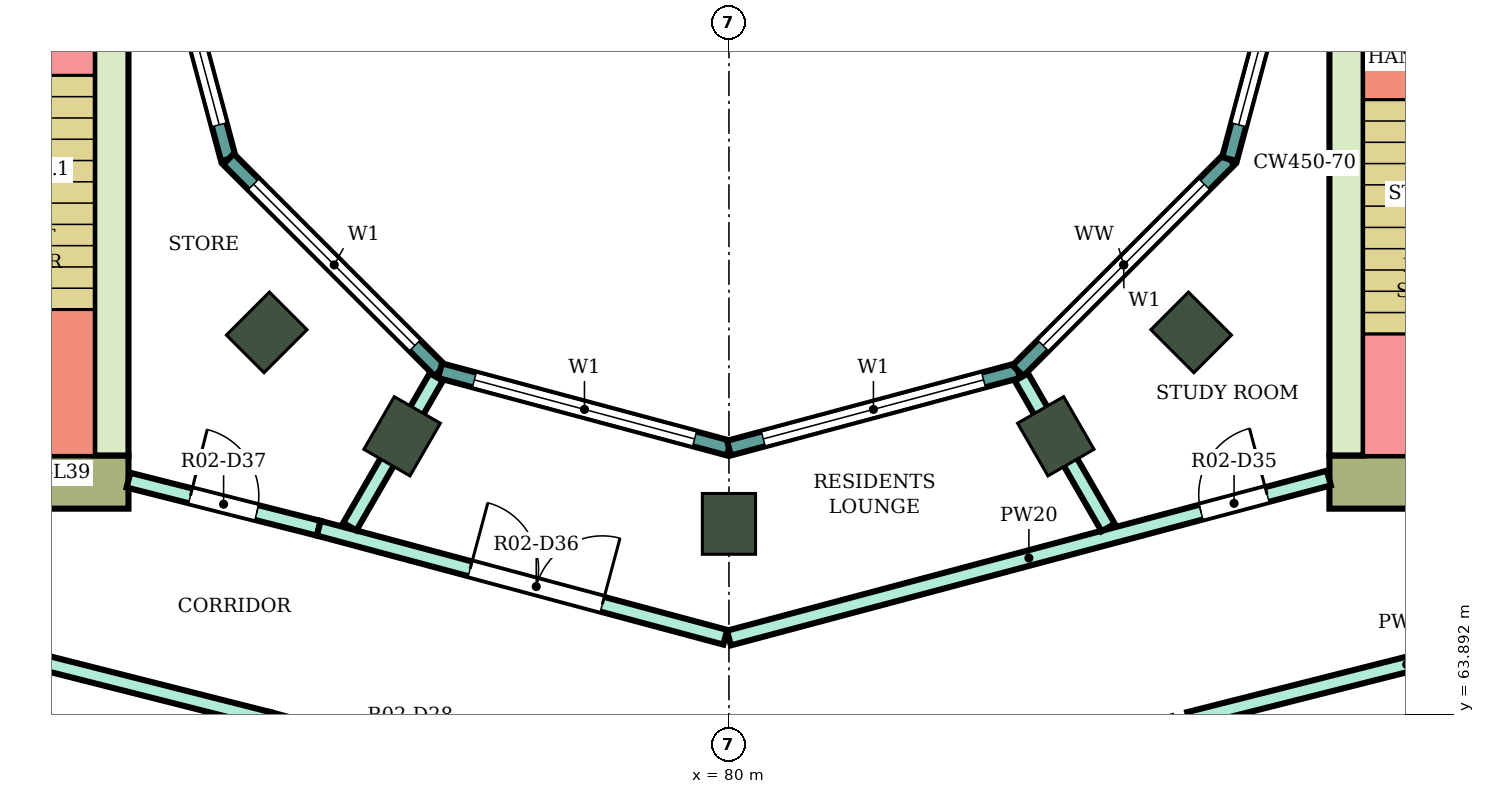
"""IFC4 building model, lengths in metres.
Left out: names, types, materials, properties, quantities, classifications, styles, units other than length and angle.
Written with IfcOpenShell. Run it as: python <this file> out.ifc"""

import sys

from ifc_helpers import new_model, si_unit, direction, frame, frame_2d, origin, origin_2d, place, context, subcontext, project, spatial, rectangle, extrude, element, fill, save


model = new_model("IFC4")
c1 = context("Model", 3, precision=1e-05, world=origin(), true_north=direction((0.0, 1.0)))
c2 = subcontext(c1, "Body", "Model", "MODEL_VIEW")
j1 = project(units=[si_unit("LENGTHUNIT", "METRE"), si_unit("PLANEANGLEUNIT", "RADIAN")], contexts=[c1])
p1 = place(None, origin())
s1 = spatial("IfcSite", under=j1, at=p1, CompositionType="ELEMENT")
p2 = place(p1, origin())
s2 = spatial("IfcBuilding", under=s1, at=p2, CompositionType="ELEMENT")
p3 = place(p2, frame((0.0, 0.0, 170.0)))
s3 = spatial("IfcBuildingStorey", under=s2, at=p3, CompositionType="ELEMENT", Elevation=170.0)
for number, where, z_axis, x_axis in (
    (1, (73.919, 68.919, 0.0), (0.0, 0.0, 1.0), (-0.707, -0.707, 0.0)),
    (2, (75.7, 67.552, 0.0), (0.0, 0.0, 1.0), (-0.5, -0.866, 0.0)),
    (3, (80.0, 66.4, 0.0), (0.0, 0.0, 1.0), (0.0, -1.0, 0.0)),
    (4, (84.3, 67.552, 0.0), (0.0, 0.0, 1.0), (0.5, -0.866, 0.0)),
    (5, (86.081, 68.919, 0.0), (0.0, 0.0, 1.0), (0.707, -0.707, 0.0)),
):
    element("IfcColumn", number, at=place(p3, frame(where, z_axis=z_axis, x_axis=x_axis)), inside=s3, PredefinedType="COLUMN", context=c2, shape_type="SweptSolid", body=[
        extrude(rectangle(XDim=0.8, YDim=0.7, at=origin_2d()), origin(), (0.0, 0.0, 1.0), 4.1),
    ])
p4 = place(p3, frame((87.9, 66.95, 0.0), z_axis=(0.0, 0.0, 1.0), x_axis=(1.0, 0.0, 0.0)))
e6 = element("IfcWall", 6, at=p4, inside=s3, PredefinedType="SHEAR", context=c2, shape_type="SweptSolid", body=[
    extrude(rectangle(XDim=14.8, YDim=0.7, at=frame_2d((7.4, 0.0))), origin(), (0.0, 0.0, 1.0), 3.78),
])
p5 = place(p4, frame((4.2, 0.0, 0.0)))
e7 = element("IfcOpeningElement", 7, at=p5, cuts=e6, PredefinedType="OPENING", context=c2, shape_type="SweptSolid", body=[
    extrude(rectangle(XDim=2.4, YDim=2.4, at=frame_2d((1.2, 1.2))), frame((0.0, 0.36, 0.0), z_axis=(0.0, -1.0, 0.0), x_axis=(1.0, 0.0, 0.0)), (0.0, 0.0, 1.0), 0.72),
])
p6 = place(p3, frame((88.125, 67.3, 0.0), z_axis=(0.0, 0.0, 1.0), x_axis=(0.0, 1.0, 0.0)))
e8 = element("IfcWall", 8, at=p6, inside=s3, PredefinedType="SHEAR", context=c2, shape_type="SweptSolid", body=[
    extrude(rectangle(XDim=7.7, YDim=0.45, at=frame_2d((3.85, 0.0))), origin(), (0.0, 0.0, 1.0), 3.78),
])
p7 = place(p3, frame((72.1, 66.95, 0.0), z_axis=(0.0, 0.0, 1.0), x_axis=(-1.0, 0.0, 0.0)))
e9 = element("IfcWall", 9, at=p7, inside=s3, PredefinedType="SHEAR", context=c2, shape_type="SweptSolid", body=[
    extrude(rectangle(XDim=14.8, YDim=0.7, at=frame_2d((7.4, 0.0))), origin(), (0.0, 0.0, 1.0), 3.78),
])
p8 = place(p7, frame((4.2, 0.0, 0.0)))
e10 = element("IfcOpeningElement", 10, at=p8, cuts=e9, PredefinedType="OPENING", context=c2, shape_type="SweptSolid", body=[
    extrude(rectangle(XDim=2.4, YDim=2.4, at=frame_2d((1.2, 1.2))), frame((0.0, 0.36, 0.0), z_axis=(0.0, -1.0, 0.0), x_axis=(1.0, 0.0, 0.0)), (0.0, 0.0, 1.0), 0.72),
])
p9 = place(p3, frame((71.875, 75.0, 0.0), z_axis=(0.0, 0.0, 1.0), x_axis=(0.0, -1.0, 0.0)))
e11 = element("IfcWall", 11, at=p9, inside=s3, PredefinedType="SHEAR", context=c2, shape_type="SweptSolid", body=[
    extrude(rectangle(XDim=7.7, YDim=0.45, at=frame_2d((3.85, 0.0))), origin(), (0.0, 0.0, 1.0), 3.78),
])
p10 = place(p3, frame((72.396, 75.0, 0.0), z_axis=(0.0, 0.0, 1.0), x_axis=(0.258789828301, -0.965933654434, 0.0)))
e12 = element("IfcWall", 12, at=p10, inside=s3, PredefinedType="NOTDEFINED", context=c2, shape_type="SweptSolid", body=[
    extrude(rectangle(XDim=3.936, YDim=0.2, at=frame_2d((1.968, 0.0))), origin(), (0.0, 0.0, 1.0), 4.1),
])
p11 = place(p10, frame((0.468, 0.0, 0.9)))
e13 = element("IfcOpeningElement", 13, at=p11, cuts=e12, PredefinedType="OPENING", context=c2, shape_type="SweptSolid", body=[
    extrude(rectangle(XDim=3.0, YDim=2.3, at=frame_2d((1.5, 1.15))), frame((0.0, 0.11, 0.0), z_axis=(0.0, -1.0, 0.0), x_axis=(1.0, 0.0, 0.0)), (0.0, 0.0, 1.0), 0.22),
])
p12 = place(p3, frame((73.415, 71.198, 0.0), z_axis=(0.0, 0.0, 1.0), x_axis=(0.707106781187, -0.707106781187, 0.0)))
e14 = element("IfcWall", 14, at=p12, inside=s3, PredefinedType="NOTDEFINED", context=c2, shape_type="SweptSolid", body=[
    extrude(rectangle(XDim=3.936, YDim=0.2, at=frame_2d((1.968, 0.0))), origin(), (0.0, 0.0, 1.0), 4.1),
])
p13 = place(p12, frame((0.468, 0.0, 0.9)))
e15 = element("IfcOpeningElement", 15, at=p13, cuts=e14, PredefinedType="OPENING", context=c2, shape_type="SweptSolid", body=[
    extrude(rectangle(XDim=3.0, YDim=2.3, at=frame_2d((1.5, 1.15))), frame((0.0, 0.11, 0.0), z_axis=(0.0, -1.0, 0.0), x_axis=(1.0, 0.0, 0.0)), (0.0, 0.0, 1.0), 0.22),
])
p14 = place(p3, frame((76.198, 68.415, 0.0), z_axis=(0.0, 0.0, 1.0), x_axis=(0.965933654434, -0.258789828301, 0.0)))
e16 = element("IfcWall", 16, at=p14, inside=s3, PredefinedType="NOTDEFINED", context=c2, shape_type="SweptSolid", body=[
    extrude(rectangle(XDim=3.936, YDim=0.2, at=frame_2d((1.968, 0.0))), origin(), (0.0, 0.0, 1.0), 4.1),
])
p15 = place(p14, frame((0.468, 0.0, 0.9)))
e17 = element("IfcOpeningElement", 17, at=p15, cuts=e16, PredefinedType="OPENING", context=c2, shape_type="SweptSolid", body=[
    extrude(rectangle(XDim=3.0, YDim=2.3, at=frame_2d((1.5, 1.15))), frame((0.0, 0.11, 0.0), z_axis=(0.0, -1.0, 0.0), x_axis=(1.0, 0.0, 0.0)), (0.0, 0.0, 1.0), 0.22),
])
p16 = place(p3, frame((80.0, 67.396, 0.0), z_axis=(0.0, 0.0, 1.0), x_axis=(0.965933654434, 0.258789828301, 0.0)))
e18 = element("IfcWall", 18, at=p16, inside=s3, PredefinedType="NOTDEFINED", context=c2, shape_type="SweptSolid", body=[
    extrude(rectangle(XDim=3.936, YDim=0.2, at=frame_2d((1.968, 0.0))), origin(), (0.0, 0.0, 1.0), 4.1),
])
p17 = place(p16, frame((0.468, 0.0, 0.9)))
e19 = element("IfcOpeningElement", 19, at=p17, cuts=e18, PredefinedType="OPENING", context=c2, shape_type="SweptSolid", body=[
    extrude(rectangle(XDim=3.0, YDim=2.3, at=frame_2d((1.5, 1.15))), frame((0.0, 0.11, 0.0), z_axis=(0.0, -1.0, 0.0), x_axis=(1.0, 0.0, 0.0)), (0.0, 0.0, 1.0), 0.22),
])
p18 = place(p3, frame((83.802, 68.415, 0.0), z_axis=(0.0, 0.0, 1.0), x_axis=(0.707106781187, 0.707106781187, 0.0)))
e20 = element("IfcWall", 20, at=p18, inside=s3, PredefinedType="NOTDEFINED", context=c2, shape_type="SweptSolid", body=[
    extrude(rectangle(XDim=3.936, YDim=0.2, at=frame_2d((1.968, 0.0))), origin(), (0.0, 0.0, 1.0), 4.1),
])
p19 = place(p18, frame((0.468, 0.0, 0.9)))
e21 = element("IfcOpeningElement", 21, at=p19, cuts=e20, PredefinedType="OPENING", context=c2, shape_type="SweptSolid", body=[
    extrude(rectangle(XDim=3.0, YDim=2.3, at=frame_2d((1.5, 1.15))), frame((0.0, 0.11, 0.0), z_axis=(0.0, -1.0, 0.0), x_axis=(1.0, 0.0, 0.0)), (0.0, 0.0, 1.0), 0.22),
])
p20 = place(p3, frame((86.585, 71.198, 0.0), z_axis=(0.0, 0.0, 1.0), x_axis=(0.258789828301, 0.965933654434, 0.0)))
e22 = element("IfcWall", 22, at=p20, inside=s3, PredefinedType="NOTDEFINED", context=c2, shape_type="SweptSolid", body=[
    extrude(rectangle(XDim=3.936, YDim=0.2, at=frame_2d((1.968, 0.0))), origin(), (0.0, 0.0, 1.0), 4.1),
])
p21 = place(p20, frame((0.468, 0.0, 0.9)))
e23 = element("IfcOpeningElement", 23, at=p21, cuts=e22, PredefinedType="OPENING", context=c2, shape_type="SweptSolid", body=[
    extrude(rectangle(XDim=3.0, YDim=2.3, at=frame_2d((1.5, 1.15))), frame((0.0, 0.11, 0.0), z_axis=(0.0, -1.0, 0.0), x_axis=(1.0, 0.0, 0.0)), (0.0, 0.0, 1.0), 0.22),
])
p22 = place(p3, frame((69.86, 64.86, 0.0), z_axis=(0.0, 0.0, 1.0), x_axis=(0.96942980222, -0.245368821506, 0.0)))
e24 = element("IfcWall", 24, at=p22, inside=s3, PredefinedType="PARTITIONING", context=c2, shape_type="SweptSolid", body=[
    extrude(rectangle(XDim=4.216, YDim=0.2, at=frame_2d((2.108, 0.0))), origin(), (0.0, 0.0, 1.0), 3.65),
])
p23 = place(p3, frame((72.1, 66.975, 0.0), z_axis=(0.0, 0.0, 1.0), x_axis=(0.969471314457, -0.245204752086, 0.0)))
e25 = element("IfcWall", 25, at=p23, inside=s3, PredefinedType="PARTITIONING", context=c2, shape_type="SweptSolid", body=[
    extrude(rectangle(XDim=2.582, YDim=0.2, at=frame_2d((1.291, 0.0))), origin(), (0.0, 0.0, 1.0), 3.65),
])
p24 = place(p23, frame((0.841, 0.0, 0.0)))
e26 = element("IfcOpeningElement", 26, at=p24, cuts=e25, PredefinedType="OPENING", context=c2, shape_type="SweptSolid", body=[
    extrude(rectangle(XDim=0.9, YDim=2.1, at=frame_2d((0.45, 1.05))), frame((0.0, 0.11, 0.0), z_axis=(0.0, -1.0, 0.0), x_axis=(1.0, 0.0, 0.0)), (0.0, 0.0, 1.0), 0.22),
])
p25 = place(p3, frame((73.947, 63.826, 0.0), z_axis=(0.0, 0.0, 1.0), x_axis=(0.965908253407, -0.258884619088, 0.0)))
e27 = element("IfcWall", 27, at=p25, inside=s3, PredefinedType="PARTITIONING", context=c2, shape_type="SweptSolid", body=[
    extrude(rectangle(XDim=6.217, YDim=0.2, at=frame_2d((3.108, 0.0))), origin(), (0.0, 0.0, 1.0), 3.65),
])
p26 = place(p25, frame((1.424, 0.0, 0.0)))
e28 = element("IfcOpeningElement", 28, at=p26, cuts=e27, PredefinedType="OPENING", context=c2, shape_type="SweptSolid", body=[
    extrude(rectangle(XDim=1.0, YDim=2.1, at=frame_2d((0.5, 1.05))), frame((0.0, 0.11, 0.0), z_axis=(0.0, -1.0, 0.0), x_axis=(1.0, 0.0, 0.0)), (0.0, 0.0, 1.0), 0.22),
])
p27 = place(p3, frame((74.603, 66.342, 0.0), z_axis=(0.0, 0.0, 1.0), x_axis=(0.965895298152, -0.258932950796, 0.0)))
e29 = element("IfcWall", 29, at=p27, inside=s3, PredefinedType="PARTITIONING", context=c2, shape_type="SweptSolid", body=[
    extrude(rectangle(XDim=5.538, YDim=0.2, at=frame_2d((2.769, 0.0))), origin(), (0.0, 0.0, 1.0), 3.65),
])
p28 = place(p27, frame((2.062, 0.0, 0.0)))
e30 = element("IfcOpeningElement", 30, at=p28, cuts=e29, PredefinedType="OPENING", context=c2, shape_type="SweptSolid", body=[
    extrude(rectangle(XDim=1.8, YDim=2.1, at=frame_2d((0.9, 1.05))), frame((0.0, 0.11, 0.0), z_axis=(0.0, -1.0, 0.0), x_axis=(1.0, 0.0, 0.0)), (0.0, 0.0, 1.0), 0.22),
])
p29 = place(p3, frame((75.012, 66.363, 0.0), z_axis=(0.0, 0.0, 1.0), x_axis=(0.500168489725, 0.86592810434, 0.0)))
e31 = element("IfcWall", 31, at=p29, inside=s3, PredefinedType="PARTITIONING", context=c2, shape_type="SweptSolid", body=[
    extrude(rectangle(XDim=2.274, YDim=0.2, at=frame_2d((1.137, 0.0))), origin(), (0.0, 0.0, 1.0), 3.65),
])
p30 = place(p3, frame((80.0, 64.898, 0.0), z_axis=(0.0, 0.0, 1.0), x_axis=(0.966237419782, 0.257653349704, 0.0)))
e32 = element("IfcWall", 32, at=p30, inside=s3, PredefinedType="PARTITIONING", context=c2, shape_type="SweptSolid", body=[
    extrude(rectangle(XDim=8.169, YDim=0.2, at=frame_2d((4.084, 0.0))), origin(), (0.0, 0.0, 1.0), 3.65),
])
p31 = place(p30, frame((6.428, 0.0, 0.0)))
e33 = element("IfcOpeningElement", 33, at=p31, cuts=e32, PredefinedType="OPENING", context=c2, shape_type="SweptSolid", body=[
    extrude(rectangle(XDim=0.9, YDim=2.1, at=frame_2d((0.45, 1.05))), frame((0.0, 0.11, 0.0), z_axis=(0.0, -1.0, 0.0), x_axis=(1.0, 0.0, 0.0)), (0.0, 0.0, 1.0), 0.22),
])
p32 = place(p3, frame((83.847, 68.331, 0.0), z_axis=(0.0, 0.0, 1.0), x_axis=(0.499851978358, -0.866110847255, 0.0)))
e34 = element("IfcWall", 34, at=p32, inside=s3, PredefinedType="PARTITIONING", context=c2, shape_type="SweptSolid", body=[
    extrude(rectangle(XDim=2.284, YDim=0.2, at=frame_2d((1.142, 0.0))), origin(), (0.0, 0.0, 1.0), 3.65),
])
p33 = place(p3, frame((86.053, 63.826, 0.0), z_axis=(0.0, 0.0, 1.0), x_axis=(0.969490004987, 0.245130843083, 0.0)))
e35 = element("IfcWall", 35, at=p33, inside=s3, PredefinedType="PARTITIONING", context=c2, shape_type="SweptSolid", body=[
    extrude(rectangle(XDim=5.908, YDim=0.2, at=frame_2d((2.954, 0.0))), origin(), (0.0, 0.0, 1.0), 3.65),
])
p34 = place(p11, origin())
e36 = element("IfcWindow", 36, at=p34, inside=s3, PartitioningType="SINGLE_PANEL", PredefinedType="WINDOW", context=c2, shape_type="SweptSolid", body=[
    extrude(rectangle(XDim=3.0, YDim=2.3, at=frame_2d((1.5, 1.15))), frame((0.0, 0.03, 0.0), z_axis=(0.0, -1.0, 0.0), x_axis=(1.0, 0.0, 0.0)), (0.0, 0.0, 1.0), 0.06),
])
fill(e13, e36)
p35 = place(p13, origin())
e37 = element("IfcWindow", 37, at=p35, inside=s3, PartitioningType="SINGLE_PANEL", PredefinedType="WINDOW", context=c2, shape_type="SweptSolid", body=[
    extrude(rectangle(XDim=3.0, YDim=2.3, at=frame_2d((1.5, 1.15))), frame((0.0, 0.03, 0.0), z_axis=(0.0, -1.0, 0.0), x_axis=(1.0, 0.0, 0.0)), (0.0, 0.0, 1.0), 0.06),
])
fill(e15, e37)
p36 = place(p15, origin())
e38 = element("IfcWindow", 38, at=p36, inside=s3, PartitioningType="SINGLE_PANEL", PredefinedType="WINDOW", context=c2, shape_type="SweptSolid", body=[
    extrude(rectangle(XDim=3.0, YDim=2.3, at=frame_2d((1.5, 1.15))), frame((0.0, 0.03, 0.0), z_axis=(0.0, -1.0, 0.0), x_axis=(1.0, 0.0, 0.0)), (0.0, 0.0, 1.0), 0.06),
])
fill(e17, e38)
p37 = place(p17, origin())
e39 = element("IfcWindow", 39, at=p37, inside=s3, PartitioningType="SINGLE_PANEL", PredefinedType="WINDOW", context=c2, shape_type="SweptSolid", body=[
    extrude(rectangle(XDim=3.0, YDim=2.3, at=frame_2d((1.5, 1.15))), frame((0.0, 0.03, 0.0), z_axis=(0.0, -1.0, 0.0), x_axis=(1.0, 0.0, 0.0)), (0.0, 0.0, 1.0), 0.06),
])
fill(e19, e39)
p38 = place(p19, origin())
e40 = element("IfcWindow", 40, at=p38, inside=s3, PartitioningType="SINGLE_PANEL", PredefinedType="WINDOW", context=c2, shape_type="SweptSolid", body=[
    extrude(rectangle(XDim=3.0, YDim=2.3, at=frame_2d((1.5, 1.15))), frame((0.0, 0.03, 0.0), z_axis=(0.0, -1.0, 0.0), x_axis=(1.0, 0.0, 0.0)), (0.0, 0.0, 1.0), 0.06),
])
fill(e21, e40)
p39 = place(p21, origin())
e41 = element("IfcWindow", 41, at=p39, inside=s3, PartitioningType="SINGLE_PANEL", PredefinedType="WINDOW", context=c2, shape_type="SweptSolid", body=[
    extrude(rectangle(XDim=3.0, YDim=2.3, at=frame_2d((1.5, 1.15))), frame((0.0, 0.03, 0.0), z_axis=(0.0, -1.0, 0.0), x_axis=(1.0, 0.0, 0.0)), (0.0, 0.0, 1.0), 0.06),
])
fill(e23, e41)
p40 = place(p31, origin())
e42 = element("IfcDoor", 42, at=p40, inside=s3, OperationType="SINGLE_SWING_RIGHT", PredefinedType="DOOR", context=c2, shape_type="SweptSolid", body=[
    extrude(rectangle(XDim=0.9, YDim=2.1, at=frame_2d((0.45, 1.05))), frame((0.0, 0.025, 0.0), z_axis=(0.0, -1.0, 0.0), x_axis=(1.0, 0.0, 0.0)), (0.0, 0.0, 1.0), 0.05),
])
fill(e33, e42)
p41 = place(p28, origin())
e43 = element("IfcDoor", 43, at=p41, inside=s3, OperationType="DOUBLE_DOOR_SINGLE_SWING", PredefinedType="DOOR", context=c2, shape_type="SweptSolid", body=[
    extrude(rectangle(XDim=1.8, YDim=2.1, at=frame_2d((0.9, 1.05))), frame((0.0, 0.025, 0.0), z_axis=(0.0, -1.0, 0.0), x_axis=(1.0, 0.0, 0.0)), (0.0, 0.0, 1.0), 0.05),
])
fill(e30, e43)
p42 = place(p24, origin())
e44 = element("IfcDoor", 44, at=p42, inside=s3, OperationType="SINGLE_SWING_LEFT", PredefinedType="DOOR", context=c2, shape_type="SweptSolid", body=[
    extrude(rectangle(XDim=0.9, YDim=2.1, at=frame_2d((0.45, 1.05))), frame((0.0, 0.025, 0.0), z_axis=(0.0, -1.0, 0.0), x_axis=(1.0, 0.0, 0.0)), (0.0, 0.0, 1.0), 0.05),
])
fill(e26, e44)
save(model, sys.argv[1])
